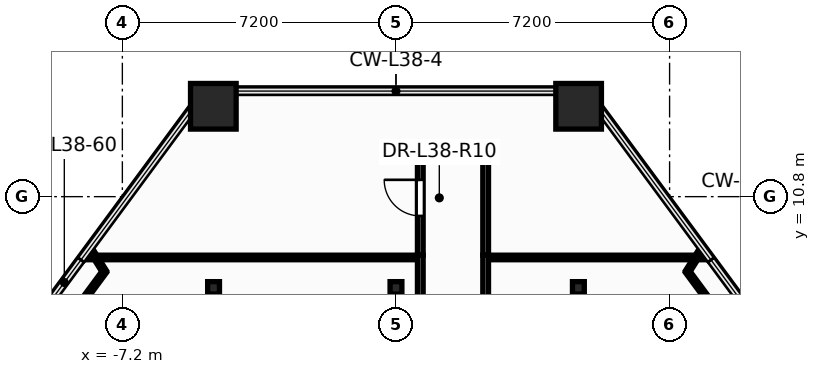
"""IFC4 building model, lengths in metres.
Left out: names, types, materials, properties, quantities, classifications, styles, units other than length and angle.
Written with IfcOpenShell. Run it as: python <this file> out.ifc"""

import sys

from ifc_helpers import new_model, si_unit, direction, frame, frame_2d, origin, origin_2d, place, context, subcontext, project, spatial, rectangle, hollow_rectangle, i_section, extrude, element, fill, save


model = new_model("IFC4")
c1 = context("Model", 3, precision=1e-05, world=origin(), true_north=direction((0.0, 1.0)))
c2 = subcontext(c1, "Body", "Model", "MODEL_VIEW")
j1 = project(units=[si_unit("LENGTHUNIT", "METRE"), si_unit("PLANEANGLEUNIT", "RADIAN")], contexts=[c1])
p1 = place(None, origin())
s1 = spatial("IfcSite", under=j1, at=p1, CompositionType="ELEMENT")
p2 = place(p1, origin())
s2 = spatial("IfcBuilding", under=s1, at=p2, CompositionType="ELEMENT")
p3 = place(p2, frame((0.0, 0.0, 147.3)))
s3 = spatial("IfcBuildingStorey", under=s2, at=p3, CompositionType="ELEMENT", Elevation=147.3)
for number, where, z_axis, x_axis in (
    (1, (4.806, 13.178, 0.0), (0.0, 0.0, 1.0), (1.0, 0.0, 0.0)),
    (2, (-4.806, 13.178, 0.0), (0.0, 0.0, 1.0), (1.0, 0.0, 0.0)),
):
    element("IfcColumn", number, at=place(p3, frame(where, z_axis=z_axis, x_axis=x_axis)), inside=s3, PredefinedType="COLUMN", context=c2, shape_type="SweptSolid", body=[
        extrude(hollow_rectangle(XDim=1.2, YDim=1.2, WallThickness=0.055, at=origin_2d()), origin(), (0.0, 0.0, 1.0), 3.6),
    ])
for number, where, z_axis, x_axis in (
    (3, (-4.8, 8.4, 0.0), (0.0, 0.0, 1.0), (1.0, 0.0, 0.0)),
    (4, (0.0, 8.4, 0.0), (0.0, 0.0, 1.0), (1.0, 0.0, 0.0)),
    (5, (4.8, 8.4, 0.0), (0.0, 0.0, 1.0), (1.0, 0.0, 0.0)),
):
    element("IfcColumn", number, at=place(p3, frame(where, z_axis=z_axis, x_axis=x_axis)), inside=s3, PredefinedType="COLUMN", context=c2, shape_type="SweptSolid", body=[
        extrude(i_section(OverallWidth=0.311, OverallDepth=0.327, WebThickness=0.016, FlangeThickness=0.025, at=origin_2d()), origin(), (0.0, 0.0, 1.0), 3.6),
    ])
p4 = place(p3, frame((-8.12, 9.2, 0.0), z_axis=(0.0, 0.0, 1.0), x_axis=(1.0, 0.0, 0.0)))
e6 = element("IfcWall", 6, at=p4, inside=s3, PredefinedType="PARTITIONING", context=c2, shape_type="SweptSolid", body=[
    extrude(rectangle(XDim=8.76, YDim=0.12, at=frame_2d((4.38, 0.0))), origin(), (0.0, 0.0, 1.0), 2.617),
])
p5 = place(p3, frame((2.36, 9.2, 0.0), z_axis=(0.0, 0.0, 1.0), x_axis=(1.0, 0.0, 0.0)))
e7 = element("IfcWall", 7, at=p5, inside=s3, PredefinedType="PARTITIONING", context=c2, shape_type="SweptSolid", body=[
    extrude(rectangle(XDim=5.76, YDim=0.12, at=frame_2d((2.88, 0.0))), origin(), (0.0, 0.0, 1.0), 2.617),
])
p6 = place(p3, frame((0.64, 3.662, 0.0), z_axis=(0.0, 0.0, 1.0), x_axis=(0.0, 1.0, 0.0)))
e8 = element("IfcWall", 8, at=p6, inside=s3, PredefinedType="PARTITIONING", context=c2, shape_type="SweptSolid", body=[
    extrude(rectangle(XDim=5.598, YDim=0.15, at=frame_2d((2.799, 0.0))), origin(), (0.0, 0.0, 1.0), 2.617),
])
p7 = place(p6, frame((0.634, 0.0, 0.0)))
e9 = element("IfcOpeningElement", 9, at=p7, cuts=e8, PredefinedType="OPENING", context=c2, shape_type="SweptSolid", body=[
    extrude(rectangle(XDim=0.956, YDim=2.104, at=frame_2d((0.475, 1.052))), frame((0.0, 0.085, 0.0), z_axis=(0.0, -1.0, 0.0), x_axis=(1.0, 0.0, 0.0)), (0.0, 0.0, 1.0), 0.17),
])
p8 = place(p3, frame((2.36, 3.54, 0.0), z_axis=(0.0, 0.0, 1.0), x_axis=(0.0, 1.0, 0.0)))
e10 = element("IfcWall", 10, at=p8, inside=s3, PredefinedType="PARTITIONING", context=c2, shape_type="SweptSolid", body=[
    extrude(rectangle(XDim=5.72, YDim=0.15, at=frame_2d((2.86, 0.0))), origin(), (0.0, 0.0, 1.0), 2.617),
])
p9 = place(p8, frame((0.398, 0.0, 0.0)))
e11 = element("IfcOpeningElement", 11, at=p9, cuts=e10, PredefinedType="OPENING", context=c2, shape_type="SweptSolid", body=[
    extrude(rectangle(XDim=0.956, YDim=2.104, at=frame_2d((0.475, 1.052))), frame((0.0, 0.085, 0.0), z_axis=(0.0, -1.0, 0.0), x_axis=(1.0, 0.0, 0.0)), (0.0, 0.0, 1.0), 0.17),
])
p10 = place(p3, frame((0.64, 9.262, 0.0), z_axis=(0.0, 0.0, 1.0), x_axis=(0.0, 1.0, 0.0)))
e12 = element("IfcWall", 12, at=p10, inside=s3, PredefinedType="PARTITIONING", context=c2, shape_type="SweptSolid", body=[
    extrude(rectangle(XDim=2.538, YDim=0.15, at=frame_2d((1.269, 0.0))), origin(), (0.0, 0.0, 1.0), 3.35),
])
p11 = place(p10, frame((1.031, 0.0, 0.0)))
e13 = element("IfcOpeningElement", 13, at=p11, cuts=e12, PredefinedType="OPENING", context=c2, shape_type="SweptSolid", body=[
    extrude(rectangle(XDim=0.956, YDim=2.104, at=frame_2d((0.475, 1.052))), frame((0.0, 0.085, 0.0), z_axis=(0.0, -1.0, 0.0), x_axis=(1.0, 0.0, 0.0)), (0.0, 0.0, 1.0), 0.17),
])
p12 = place(p3, frame((2.36, 9.262, 0.0), z_axis=(0.0, 0.0, 1.0), x_axis=(0.0, 1.0, 0.0)))
e14 = element("IfcWall", 14, at=p12, inside=s3, PredefinedType="PARTITIONING", context=c2, shape_type="SweptSolid", body=[
    extrude(rectangle(XDim=2.538, YDim=0.15, at=frame_2d((1.269, 0.0))), origin(), (0.0, 0.0, 1.0), 3.35),
])
for number, where, z_axis, x_axis in (
    (15, (-7.671, 8.827, 0.0), (0.0, 0.0, 1.0), (-0.594, -0.804, 0.0)),
    (16, (9.084, 6.914, 0.0), (0.0, 0.0, 1.0), (-0.594, 0.804, 0.0)),
):
    element("IfcWall", number, at=place(p3, frame(where, z_axis=z_axis, x_axis=x_axis)), inside=s3, PredefinedType="PARTITIONING", context=c2, shape_type="SweptSolid", body=[
        extrude(rectangle(XDim=2.378, YDim=0.12, at=frame_2d((1.189, 0.0))), origin(), (0.0, 0.0, 1.0), 3.35),
    ])
p13 = place(p3, frame((0.64, 11.8, 0.0), z_axis=(0.0, 0.0, 1.0), x_axis=(1.0, 0.0, 0.0)))
e17 = element("IfcWall", 17, at=p13, inside=s3, PredefinedType="PARTITIONING", context=c2, shape_type="SweptSolid", body=[
    extrude(rectangle(XDim=1.72, YDim=0.15, at=frame_2d((0.86, 0.0))), origin(), (0.0, 0.0, 1.0), 3.35),
])
for number, where, z_axis, x_axis in (
    (18, (-8.054, 9.437, 0.0), (0.0, 0.0, 1.0), (0.532, -0.847, 0.0)),
    (19, (7.671, 8.827, 0.0), (0.0, 0.0, 1.0), (0.532, 0.847, 0.0)),
):
    element("IfcWall", number, at=place(p3, frame(where, z_axis=z_axis, x_axis=x_axis)), inside=s3, PredefinedType="PARTITIONING", context=c2, shape_type="SweptSolid", body=[
        extrude(rectangle(XDim=0.72, YDim=0.12, at=frame_2d((0.36, 0.0))), origin(), (0.0, 0.0, 1.0), 2.792),
    ])
p14 = place(p11, origin())
e20 = element("IfcDoor", 20, at=p14, inside=s3, OperationType="SINGLE_SWING_RIGHT", PredefinedType="DOOR", context=c2, shape_type="SweptSolid", body=[
    extrude(rectangle(XDim=0.95, YDim=2.1, at=frame_2d((0.475, 1.05))), frame((0.0, 0.025, 0.0), z_axis=(0.0, -1.0, 0.0), x_axis=(1.0, 0.0, 0.0)), (0.0, 0.0, 1.0), 0.05),
])
fill(e13, e20)
save(model, sys.argv[1])
